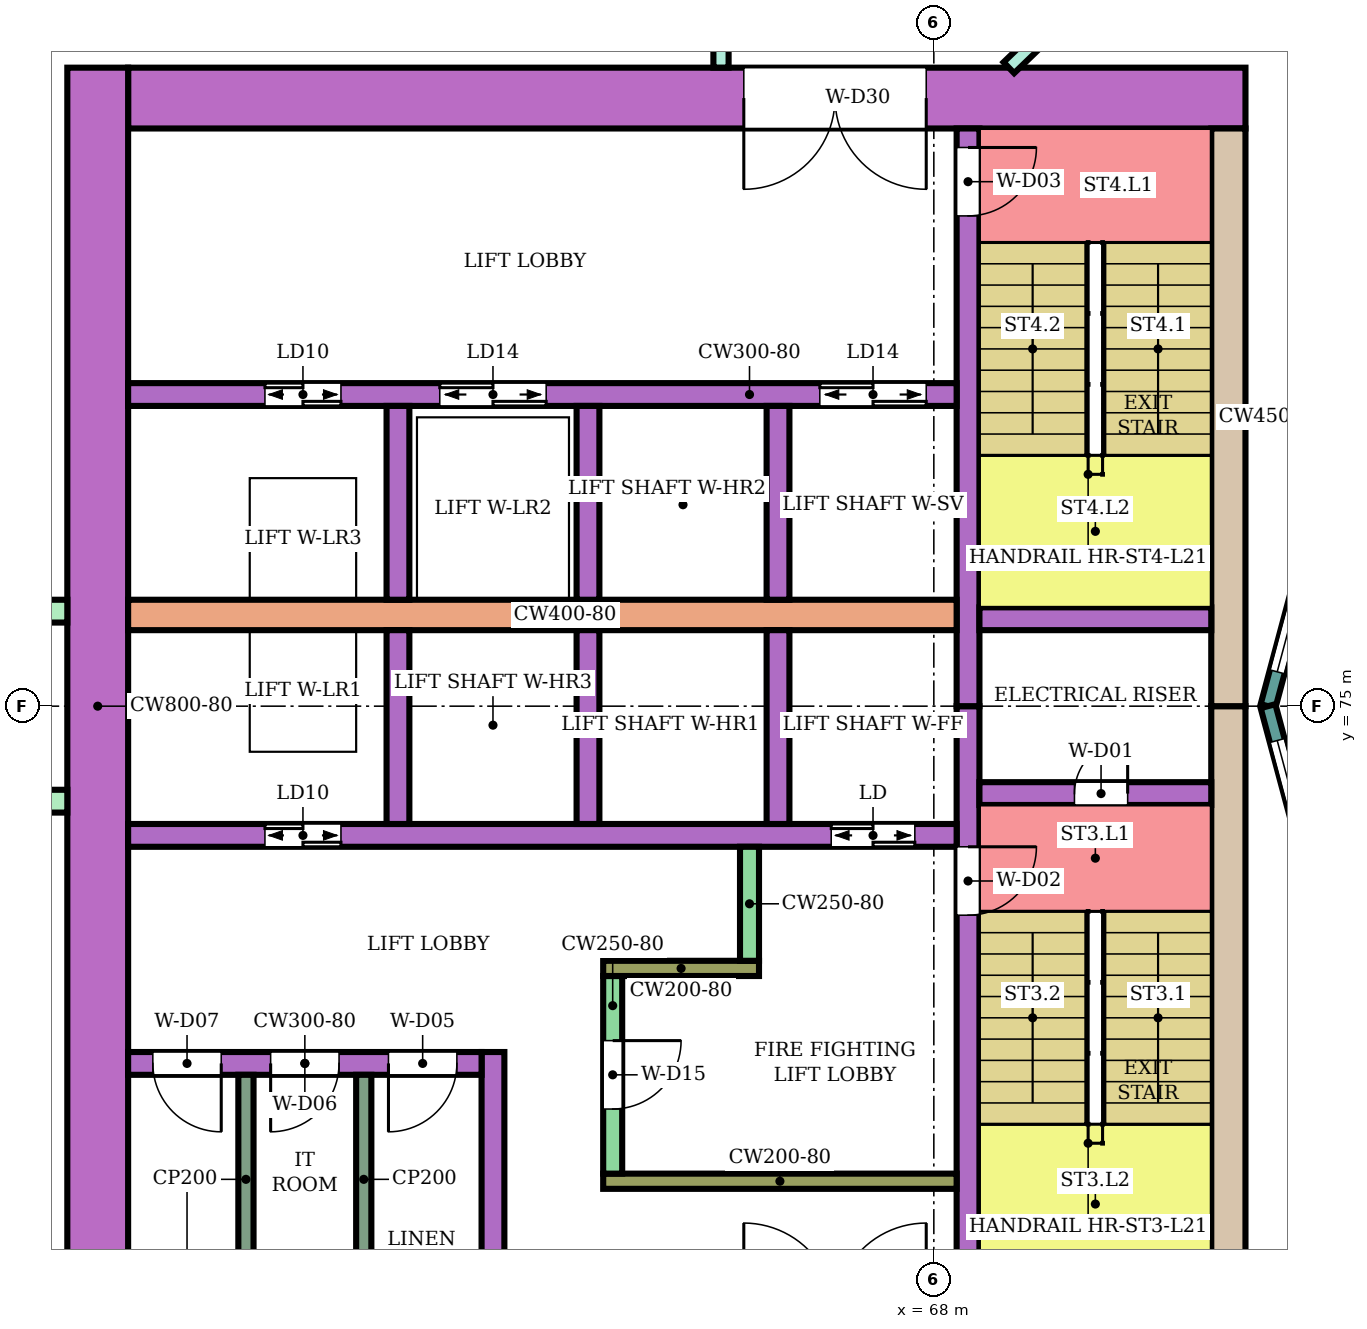
"""IFC4 building model, lengths in metres.
Left out: names, types, materials, properties, quantities, classifications, styles, units other than length and angle.
Written with IfcOpenShell. Run it as: python <this file> out.ifc"""

import sys

from ifc_helpers import new_model, si_unit, direction, frame, frame_2d, origin, place, context, subcontext, project, spatial, rectangle, extrude, element, fill, save


model = new_model("IFC4")
c1 = context("Model", 3, precision=1e-05, world=origin(), true_north=direction((0.0, 1.0)))
c2 = subcontext(c1, "Body", "Model", "MODEL_VIEW")
j1 = project(units=[si_unit("LENGTHUNIT", "METRE"), si_unit("PLANEANGLEUNIT", "RADIAN")], contexts=[c1])
p1 = place(None, origin())
s1 = spatial("IfcSite", under=j1, at=p1, CompositionType="ELEMENT")
p2 = place(p1, origin())
s2 = spatial("IfcBuilding", under=s1, at=p2, CompositionType="ELEMENT")
p3 = place(p2, frame((0.0, 0.0, 93.8)))
s3 = spatial("IfcBuildingStorey", under=s2, at=p3, CompositionType="ELEMENT", Elevation=93.8)
p4 = place(p3, frame((72.1, 83.0, 0.0), z_axis=(0.0, 0.0, 1.0), x_axis=(-1.0, 0.0, 0.0)))
e1 = element("IfcWall", 1, at=p4, inside=s3, PredefinedType="SHEAR", context=c2, shape_type="SweptSolid", body=[
    extrude(rectangle(XDim=14.7, YDim=0.8, at=frame_2d((7.35, 0.0))), origin(), (0.0, 0.0, 1.0), 3.48),
])
p5 = place(p4, frame((4.2, 0.0, 0.0)))
e2 = element("IfcOpeningElement", 2, at=p5, cuts=e1, PredefinedType="OPENING", context=c2, shape_type="SweptSolid", body=[
    extrude(rectangle(XDim=2.4, YDim=2.4, at=frame_2d((1.2, 1.2))), frame((0.0, 0.41, 0.0), z_axis=(0.0, -1.0, 0.0), x_axis=(1.0, 0.0, 0.0)), (0.0, 0.0, 1.0), 0.82),
])
for number, where, z_axis, x_axis in (
    (3, (71.875, 75.0, 0.0), (0.0, 0.0, 1.0), (0.0, -1.0, 0.0)),
    (4, (71.875, 82.6, 0.0), (0.0, 0.0, 1.0), (0.0, -1.0, 0.0)),
):
    element("IfcWall", number, at=place(p3, frame(where, z_axis=z_axis, x_axis=x_axis)), inside=s3, PredefinedType="SHEAR", context=c2, shape_type="SweptSolid", body=[
        extrude(rectangle(XDim=7.6, YDim=0.45, at=frame_2d((3.8, 0.0))), origin(), (0.0, 0.0, 1.0), 3.48),
    ])
p6 = place(p3, frame((57.0, 83.4, 0.0), z_axis=(0.0, 0.0, 1.0), x_axis=(0.0, -1.0, 0.0)))
e5 = element("IfcWall", 5, at=p6, inside=s3, PredefinedType="SHEAR", context=c2, shape_type="SweptSolid", body=[
    extrude(rectangle(XDim=16.8, YDim=0.8, at=frame_2d((8.4, 0.0))), origin(), (0.0, 0.0, 1.0), 3.48),
])
p7 = place(p3, frame((68.45, 75.0, 0.0), z_axis=(0.0, 0.0, 1.0), x_axis=(0.0, -1.0, 0.0)))
e6 = element("IfcWall", 6, at=p7, inside=s3, PredefinedType="SHEAR", context=c2, shape_type="SweptSolid", body=[
    extrude(rectangle(XDim=7.6, YDim=0.3, at=frame_2d((3.8, 0.0))), origin(), (0.0, 0.0, 1.0), 3.48),
])
p8 = place(p7, frame((1.85, 0.0, 0.0)))
e7 = element("IfcOpeningElement", 7, at=p8, cuts=e6, PredefinedType="OPENING", context=c2, shape_type="SweptSolid", body=[
    extrude(rectangle(XDim=0.9, YDim=2.1, at=frame_2d((0.45, 1.05))), frame((0.0, 0.16, 0.0), z_axis=(0.0, -1.0, 0.0), x_axis=(1.0, 0.0, 0.0)), (0.0, 0.0, 1.0), 0.32),
])
p9 = place(p3, frame((68.45, 82.6, 0.0), z_axis=(0.0, 0.0, 1.0), x_axis=(0.0, -1.0, 0.0)))
e8 = element("IfcWall", 8, at=p9, inside=s3, PredefinedType="SHEAR", context=c2, shape_type="SweptSolid", body=[
    extrude(rectangle(XDim=7.6, YDim=0.3, at=frame_2d((3.8, 0.0))), origin(), (0.0, 0.0, 1.0), 3.48),
])
p10 = place(p9, frame((0.25, 0.0, 0.0)))
e9 = element("IfcOpeningElement", 9, at=p10, cuts=e8, PredefinedType="OPENING", context=c2, shape_type="SweptSolid", body=[
    extrude(rectangle(XDim=0.9, YDim=2.1, at=frame_2d((0.45, 1.05))), frame((0.0, 0.16, 0.0), z_axis=(0.0, -1.0, 0.0), x_axis=(1.0, 0.0, 0.0)), (0.0, 0.0, 1.0), 0.32),
])
p11 = place(p3, frame((71.65, 73.85, 0.0), z_axis=(0.0, 0.0, 1.0), x_axis=(-1.0, 0.0, 0.0)))
e10 = element("IfcWall", 10, at=p11, inside=s3, PredefinedType="SHEAR", context=c2, shape_type="SweptSolid", body=[
    extrude(rectangle(XDim=3.05, YDim=0.3, at=frame_2d((1.525, 0.0))), origin(), (0.0, 0.0, 1.0), 3.48),
])
p12 = place(p11, frame((1.1, 0.0, 0.0)))
e11 = element("IfcOpeningElement", 11, at=p12, cuts=e10, PredefinedType="OPENING", context=c2, shape_type="SweptSolid", body=[
    extrude(rectangle(XDim=0.7, YDim=2.0, at=frame_2d((0.35, 1.0))), frame((0.0, 0.16, 0.0), z_axis=(0.0, -1.0, 0.0), x_axis=(1.0, 0.0, 0.0)), (0.0, 0.0, 1.0), 0.32),
])
p13 = place(p3, frame((71.65, 76.15, 0.0), z_axis=(0.0, 0.0, 1.0), x_axis=(-1.0, 0.0, 0.0)))
e12 = element("IfcWall", 12, at=p13, inside=s3, PredefinedType="SHEAR", context=c2, shape_type="SweptSolid", body=[
    extrude(rectangle(XDim=3.05, YDim=0.3, at=frame_2d((1.525, 0.0))), origin(), (0.0, 0.0, 1.0), 3.48),
])
p14 = place(p3, frame((68.3, 73.3, 0.0), z_axis=(0.0, 0.0, 1.0), x_axis=(-1.0, 0.0, 0.0)))
e13 = element("IfcWall", 13, at=p14, inside=s3, PredefinedType="SHEAR", context=c2, shape_type="SweptSolid", body=[
    extrude(rectangle(XDim=10.9, YDim=0.3, at=frame_2d((5.45, 0.0))), origin(), (0.0, 0.0, 1.0), 3.48),
])
p15 = place(p14, frame((0.55, 0.0, 0.0)))
e14 = element("IfcOpeningElement", 14, at=p15, cuts=e13, PredefinedType="OPENING", context=c2, shape_type="SweptSolid", body=[
    extrude(rectangle(XDim=1.1, YDim=2.1, at=frame_2d((0.55, 1.05))), frame((0.0, 0.16, 0.0), z_axis=(0.0, -1.0, 0.0), x_axis=(1.0, 0.0, 0.0)), (0.0, 0.0, 1.0), 0.32),
])
p16 = place(p14, frame((8.1, 0.0, 0.0)))
e15 = element("IfcOpeningElement", 15, at=p16, cuts=e13, PredefinedType="OPENING", context=c2, shape_type="SweptSolid", body=[
    extrude(rectangle(XDim=1.0, YDim=2.1, at=frame_2d((0.5, 1.05))), frame((0.0, 0.16, 0.0), z_axis=(0.0, -1.0, 0.0), x_axis=(1.0, 0.0, 0.0)), (0.0, 0.0, 1.0), 0.32),
])
p17 = place(p3, frame((68.3, 76.2, 0.0), z_axis=(0.0, 0.0, 1.0), x_axis=(-1.0, 0.0, 0.0)))
e16 = element("IfcWall", 16, at=p17, inside=s3, PredefinedType="SHEAR", context=c2, shape_type="SweptSolid", body=[
    extrude(rectangle(XDim=10.9, YDim=0.4, at=frame_2d((5.45, 0.0))), origin(), (0.0, 0.0, 1.0), 3.48),
])
p18 = place(p3, frame((68.3, 79.1, 0.0), z_axis=(0.0, 0.0, 1.0), x_axis=(-1.0, 0.0, 0.0)))
e17 = element("IfcWall", 17, at=p18, inside=s3, PredefinedType="SHEAR", context=c2, shape_type="SweptSolid", body=[
    extrude(rectangle(XDim=10.9, YDim=0.3, at=frame_2d((5.45, 0.0))), origin(), (0.0, 0.0, 1.0), 3.48),
])
p19 = place(p18, frame((0.4, 0.0, 0.0)))
e18 = element("IfcOpeningElement", 18, at=p19, cuts=e17, PredefinedType="OPENING", context=c2, shape_type="SweptSolid", body=[
    extrude(rectangle(XDim=1.4, YDim=2.1, at=frame_2d((0.7, 1.05))), frame((0.0, 0.16, 0.0), z_axis=(0.0, -1.0, 0.0), x_axis=(1.0, 0.0, 0.0)), (0.0, 0.0, 1.0), 0.32),
])
p20 = place(p18, frame((5.4, 0.0, 0.0)))
e19 = element("IfcOpeningElement", 19, at=p20, cuts=e17, PredefinedType="OPENING", context=c2, shape_type="SweptSolid", body=[
    extrude(rectangle(XDim=1.4, YDim=2.1, at=frame_2d((0.7, 1.05))), frame((0.0, 0.16, 0.0), z_axis=(0.0, -1.0, 0.0), x_axis=(1.0, 0.0, 0.0)), (0.0, 0.0, 1.0), 0.32),
])
p21 = place(p18, frame((8.1, 0.0, 0.0)))
e20 = element("IfcOpeningElement", 20, at=p21, cuts=e17, PredefinedType="OPENING", context=c2, shape_type="SweptSolid", body=[
    extrude(rectangle(XDim=1.0, YDim=2.1, at=frame_2d((0.5, 1.05))), frame((0.0, 0.16, 0.0), z_axis=(0.0, -1.0, 0.0), x_axis=(1.0, 0.0, 0.0)), (0.0, 0.0, 1.0), 0.32),
])
for number, where, z_axis, x_axis in (
    (21, (65.95, 76.0, 0.0), (0.0, 0.0, 1.0), (0.0, -1.0, 0.0)),
    (22, (63.45, 76.0, 0.0), (0.0, 0.0, 1.0), (0.0, -1.0, 0.0)),
    (23, (60.95, 76.0, 0.0), (0.0, 0.0, 1.0), (0.0, -1.0, 0.0)),
    (24, (65.95, 78.95, 0.0), (0.0, 0.0, 1.0), (0.0, -1.0, 0.0)),
    (25, (63.45, 78.95, 0.0), (0.0, 0.0, 1.0), (0.0, -1.0, 0.0)),
    (26, (60.95, 78.95, 0.0), (0.0, 0.0, 1.0), (0.0, -1.0, 0.0)),
):
    element("IfcWall", number, at=place(p3, frame(where, z_axis=z_axis, x_axis=x_axis)), inside=s3, PredefinedType="SHEAR", context=c2, shape_type="SweptSolid", body=[
        extrude(rectangle(XDim=2.55, YDim=0.3, at=frame_2d((1.275, 0.0))), origin(), (0.0, 0.0, 1.0), 3.48),
    ])
p22 = place(p3, frame((68.3, 68.75, 0.0), z_axis=(0.0, 0.0, 1.0), x_axis=(-1.0, 0.0, 0.0)))
e27 = element("IfcWall", 27, at=p22, inside=s3, PredefinedType="SHEAR", context=c2, shape_type="SweptSolid", body=[
    extrude(rectangle(XDim=4.65, YDim=0.2, at=frame_2d((2.325, 0.0))), origin(), (0.0, 0.0, 1.0), 3.48),
])
p23 = place(p3, frame((63.775, 71.45, 0.0), z_axis=(0.0, 0.0, 1.0), x_axis=(0.0, -1.0, 0.0)))
e28 = element("IfcWall", 28, at=p23, inside=s3, PredefinedType="SHEAR", context=c2, shape_type="SweptSolid", body=[
    extrude(rectangle(XDim=2.6, YDim=0.25, at=frame_2d((1.3, 0.0))), origin(), (0.0, 0.0, 1.0), 3.48),
])
p24 = place(p23, frame((0.85, 0.0, 0.0)))
e29 = element("IfcOpeningElement", 29, at=p24, cuts=e28, PredefinedType="OPENING", context=c2, shape_type="SweptSolid", body=[
    extrude(rectangle(XDim=0.9, YDim=2.1, at=frame_2d((0.45, 1.05))), frame((0.0, 0.135, 0.0), z_axis=(0.0, -1.0, 0.0), x_axis=(1.0, 0.0, 0.0)), (0.0, 0.0, 1.0), 0.27),
])
p25 = place(p3, frame((65.7, 71.55, 0.0), z_axis=(0.0, 0.0, 1.0), x_axis=(-1.0, 0.0, 0.0)))
e30 = element("IfcWall", 30, at=p25, inside=s3, PredefinedType="SHEAR", context=c2, shape_type="SweptSolid", body=[
    extrude(rectangle(XDim=2.05, YDim=0.2, at=frame_2d((1.025, 0.0))), origin(), (0.0, 0.0, 1.0), 3.48),
])
p26 = place(p3, frame((65.575, 73.15, 0.0), z_axis=(0.0, 0.0, 1.0), x_axis=(0.0, -1.0, 0.0)))
e31 = element("IfcWall", 31, at=p26, inside=s3, PredefinedType="SHEAR", context=c2, shape_type="SweptSolid", body=[
    extrude(rectangle(XDim=1.5, YDim=0.25, at=frame_2d((0.75, 0.0))), origin(), (0.0, 0.0, 1.0), 3.48),
])
p27 = place(p3, frame((62.2, 70.45, 0.0), z_axis=(0.0, 0.0, 1.0), x_axis=(0.0, -1.0, 0.0)))
e32 = element("IfcWall", 32, at=p27, inside=s3, PredefinedType="SHEAR", context=c2, shape_type="SweptSolid", body=[
    extrude(rectangle(XDim=3.05, YDim=0.3, at=frame_2d((1.525, 0.0))), origin(), (0.0, 0.0, 1.0), 3.48),
])
p28 = place(p3, frame((62.05, 70.3, 0.0), z_axis=(0.0, 0.0, 1.0), x_axis=(-1.0, 0.0, 0.0)))
e33 = element("IfcWall", 33, at=p28, inside=s3, PredefinedType="SHEAR", context=c2, shape_type="SweptSolid", body=[
    extrude(rectangle(XDim=4.65, YDim=0.3, at=frame_2d((2.325, 0.0))), origin(), (0.0, 0.0, 1.0), 3.48),
])
p29 = place(p28, frame((0.325, 0.0, 0.0)))
e34 = element("IfcOpeningElement", 34, at=p29, cuts=e33, PredefinedType="OPENING", context=c2, shape_type="SweptSolid", body=[
    extrude(rectangle(XDim=0.9, YDim=2.1, at=frame_2d((0.45, 1.05))), frame((0.0, 0.16, 0.0), z_axis=(0.0, -1.0, 0.0), x_axis=(1.0, 0.0, 0.0)), (0.0, 0.0, 1.0), 0.32),
])
p30 = place(p28, frame((1.875, 0.0, 0.0)))
e35 = element("IfcOpeningElement", 35, at=p30, cuts=e33, PredefinedType="OPENING", context=c2, shape_type="SweptSolid", body=[
    extrude(rectangle(XDim=0.9, YDim=2.1, at=frame_2d((0.45, 1.05))), frame((0.0, 0.16, 0.0), z_axis=(0.0, -1.0, 0.0), x_axis=(1.0, 0.0, 0.0)), (0.0, 0.0, 1.0), 0.32),
])
p31 = place(p28, frame((3.425, 0.0, 0.0)))
e36 = element("IfcOpeningElement", 36, at=p31, cuts=e33, PredefinedType="OPENING", context=c2, shape_type="SweptSolid", body=[
    extrude(rectangle(XDim=0.9, YDim=2.1, at=frame_2d((0.45, 1.05))), frame((0.0, 0.16, 0.0), z_axis=(0.0, -1.0, 0.0), x_axis=(1.0, 0.0, 0.0)), (0.0, 0.0, 1.0), 0.32),
])
for number, where, z_axis, x_axis in (
    (37, (56.6, 76.25, 0.0), (0.0, 0.0, 1.0), (-1.0, 0.0, 0.0)),
    (38, (56.6, 73.75, 0.0), (0.0, 0.0, 1.0), (-1.0, 0.0, 0.0)),
):
    element("IfcWall", number, at=place(p3, frame(where, z_axis=z_axis, x_axis=x_axis)), inside=s3, PredefinedType="NOTDEFINED", context=c2, shape_type="SweptSolid", body=[
        extrude(rectangle(XDim=2.416, YDim=0.3, at=frame_2d((1.208, 0.0))), origin(), (0.0, 0.0, 1.0), 3.8),
    ])
p32 = place(p3, frame((73.415, 78.802, 0.0), z_axis=(0.0, 0.0, 1.0), x_axis=(-0.258789828301, -0.965933654434, 0.0)))
e39 = element("IfcWall", 39, at=p32, inside=s3, PredefinedType="NOTDEFINED", context=c2, shape_type="SweptSolid", body=[
    extrude(rectangle(XDim=3.936, YDim=0.2, at=frame_2d((1.968, 0.0))), origin(), (0.0, 0.0, 1.0), 3.8),
])
p33 = place(p32, frame((0.468, 0.0, 0.9)))
e40 = element("IfcOpeningElement", 40, at=p33, cuts=e39, PredefinedType="OPENING", context=c2, shape_type="SweptSolid", body=[
    extrude(rectangle(XDim=3.0, YDim=2.3, at=frame_2d((1.5, 1.15))), frame((0.0, 0.11, 0.0), z_axis=(0.0, -1.0, 0.0), x_axis=(1.0, 0.0, 0.0)), (0.0, 0.0, 1.0), 0.22),
])
p34 = place(p3, frame((72.396, 75.0, 0.0), z_axis=(0.0, 0.0, 1.0), x_axis=(0.258789828301, -0.965933654434, 0.0)))
e41 = element("IfcWall", 41, at=p34, inside=s3, PredefinedType="NOTDEFINED", context=c2, shape_type="SweptSolid", body=[
    extrude(rectangle(XDim=3.936, YDim=0.2, at=frame_2d((1.968, 0.0))), origin(), (0.0, 0.0, 1.0), 3.8),
])
p35 = place(p34, frame((0.468, 0.0, 0.9)))
e42 = element("IfcOpeningElement", 42, at=p35, cuts=e41, PredefinedType="OPENING", context=c2, shape_type="SweptSolid", body=[
    extrude(rectangle(XDim=3.0, YDim=2.3, at=frame_2d((1.5, 1.15))), frame((0.0, 0.11, 0.0), z_axis=(0.0, -1.0, 0.0), x_axis=(1.0, 0.0, 0.0)), (0.0, 0.0, 1.0), 0.22),
])
p36 = place(p3, frame((65.2, 83.401, 0.0), z_axis=(0.0, 0.0, 1.0), x_axis=(0.0, 1.0, 0.0)))
e43 = element("IfcWall", 43, at=p36, inside=s3, PredefinedType="PARTITIONING", context=c2, shape_type="SweptSolid", body=[
    extrude(rectangle(XDim=1.399, YDim=0.2, at=frame_2d((0.7, 0.0))), origin(), (0.0, 0.0, 1.0), 3.35),
])
p37 = place(p3, frame((68.987, 83.4, 0.0), z_axis=(0.0, 0.0, 1.0), x_axis=(0.719586298962, 0.694403022997, 0.0)))
e44 = element("IfcWall", 44, at=p37, inside=s3, PredefinedType="PARTITIONING", context=c2, shape_type="SweptSolid", body=[
    extrude(rectangle(XDim=5.439, YDim=0.2, at=frame_2d((2.719, 0.0))), origin(), (0.0, 0.0, 1.0), 3.35),
])
for number, where, z_axis, x_axis in (
    (45, (60.5, 70.15, 0.0), (0.0, 0.0, 1.0), (0.0, -1.0, 0.0)),
    (46, (58.95, 70.15, 0.0), (0.0, 0.0, 1.0), (0.0, -1.0, 0.0)),
):
    element("IfcWall", number, at=place(p3, frame(where, z_axis=z_axis, x_axis=x_axis)), inside=s3, PredefinedType="PARTITIONING", context=c2, shape_type="SweptSolid", body=[
        extrude(rectangle(XDim=2.75, YDim=0.2, at=frame_2d((1.375, 0.0))), origin(), (0.0, 0.0, 1.0), 3.48),
    ])
p38 = place(p33, origin())
e47 = element("IfcWindow", 47, at=p38, inside=s3, PartitioningType="SINGLE_PANEL", PredefinedType="WINDOW", context=c2, shape_type="SweptSolid", body=[
    extrude(rectangle(XDim=3.0, YDim=2.3, at=frame_2d((1.5, 1.15))), frame((0.0, 0.03, 0.0), z_axis=(0.0, -1.0, 0.0), x_axis=(1.0, 0.0, 0.0)), (0.0, 0.0, 1.0), 0.06),
])
fill(e40, e47)
p39 = place(p35, origin())
e48 = element("IfcWindow", 48, at=p39, inside=s3, PartitioningType="SINGLE_PANEL", PredefinedType="WINDOW", context=c2, shape_type="SweptSolid", body=[
    extrude(rectangle(XDim=3.0, YDim=2.3, at=frame_2d((1.5, 1.15))), frame((0.0, 0.03, 0.0), z_axis=(0.0, -1.0, 0.0), x_axis=(1.0, 0.0, 0.0)), (0.0, 0.0, 1.0), 0.06),
])
fill(e42, e48)
p40 = place(p12, frame((0.7, 0.0, 0.0), z_axis=(0.0, 0.0, 1.0), x_axis=(-1.0, 0.0, 0.0)))
e49 = element("IfcDoor", 49, at=p40, inside=s3, OperationType="SINGLE_SWING_RIGHT", PredefinedType="DOOR", context=c2, shape_type="SweptSolid", body=[
    extrude(rectangle(XDim=0.7, YDim=2.0, at=frame_2d((0.35, 1.0))), frame((0.0, 0.025, 0.0), z_axis=(0.0, -1.0, 0.0), x_axis=(1.0, 0.0, 0.0)), (0.0, 0.0, 1.0), 0.05),
])
fill(e11, e49)
p41 = place(p8, origin())
e50 = element("IfcDoor", 50, at=p41, inside=s3, OperationType="SINGLE_SWING_LEFT", PredefinedType="DOOR", context=c2, shape_type="SweptSolid", body=[
    extrude(rectangle(XDim=0.9, YDim=2.1, at=frame_2d((0.45, 1.05))), frame((0.0, 0.025, 0.0), z_axis=(0.0, -1.0, 0.0), x_axis=(1.0, 0.0, 0.0)), (0.0, 0.0, 1.0), 0.05),
])
fill(e7, e50)
p42 = place(p10, origin())
e51 = element("IfcDoor", 51, at=p42, inside=s3, OperationType="SINGLE_SWING_LEFT", PredefinedType="DOOR", context=c2, shape_type="SweptSolid", body=[
    extrude(rectangle(XDim=0.9, YDim=2.1, at=frame_2d((0.45, 1.05))), frame((0.0, 0.025, 0.0), z_axis=(0.0, -1.0, 0.0), x_axis=(1.0, 0.0, 0.0)), (0.0, 0.0, 1.0), 0.05),
])
fill(e9, e51)
p43 = place(p15, origin())
e52 = element("IfcDoor", 52, at=p43, inside=s3, OperationType="DOUBLE_DOOR_SLIDING", PredefinedType="DOOR", context=c2, shape_type="SweptSolid", body=[
    extrude(rectangle(XDim=1.1, YDim=2.1, at=frame_2d((0.55, 1.05))), frame((0.0, 0.025, 0.0), z_axis=(0.0, -1.0, 0.0), x_axis=(1.0, 0.0, 0.0)), (0.0, 0.0, 1.0), 0.05),
])
fill(e14, e52)
p44 = place(p16, origin())
e53 = element("IfcDoor", 53, at=p44, inside=s3, OperationType="DOUBLE_DOOR_SLIDING", PredefinedType="DOOR", context=c2, shape_type="SweptSolid", body=[
    extrude(rectangle(XDim=1.0, YDim=2.1, at=frame_2d((0.5, 1.05))), frame((0.0, 0.025, 0.0), z_axis=(0.0, -1.0, 0.0), x_axis=(1.0, 0.0, 0.0)), (0.0, 0.0, 1.0), 0.05),
])
fill(e15, e53)
p45 = place(p19, origin())
e54 = element("IfcDoor", 54, at=p45, inside=s3, OperationType="DOUBLE_DOOR_SLIDING", PredefinedType="DOOR", context=c2, shape_type="SweptSolid", body=[
    extrude(rectangle(XDim=1.4, YDim=2.1, at=frame_2d((0.7, 1.05))), frame((0.0, 0.025, 0.0), z_axis=(0.0, -1.0, 0.0), x_axis=(1.0, 0.0, 0.0)), (0.0, 0.0, 1.0), 0.05),
])
fill(e18, e54)
p46 = place(p20, origin())
e55 = element("IfcDoor", 55, at=p46, inside=s3, OperationType="DOUBLE_DOOR_SLIDING", PredefinedType="DOOR", context=c2, shape_type="SweptSolid", body=[
    extrude(rectangle(XDim=1.4, YDim=2.1, at=frame_2d((0.7, 1.05))), frame((0.0, 0.025, 0.0), z_axis=(0.0, -1.0, 0.0), x_axis=(1.0, 0.0, 0.0)), (0.0, 0.0, 1.0), 0.05),
])
fill(e19, e55)
p47 = place(p21, origin())
e56 = element("IfcDoor", 56, at=p47, inside=s3, OperationType="DOUBLE_DOOR_SLIDING", PredefinedType="DOOR", context=c2, shape_type="SweptSolid", body=[
    extrude(rectangle(XDim=1.0, YDim=2.1, at=frame_2d((0.5, 1.05))), frame((0.0, 0.025, 0.0), z_axis=(0.0, -1.0, 0.0), x_axis=(1.0, 0.0, 0.0)), (0.0, 0.0, 1.0), 0.05),
])
fill(e20, e56)
p48 = place(p24, origin())
e57 = element("IfcDoor", 57, at=p48, inside=s3, OperationType="SINGLE_SWING_LEFT", PredefinedType="DOOR", context=c2, shape_type="SweptSolid", body=[
    extrude(rectangle(XDim=0.9, YDim=2.1, at=frame_2d((0.45, 1.05))), frame((0.0, 0.025, 0.0), z_axis=(0.0, -1.0, 0.0), x_axis=(1.0, 0.0, 0.0)), (0.0, 0.0, 1.0), 0.05),
])
fill(e29, e57)
p49 = place(p29, origin())
e58 = element("IfcDoor", 58, at=p49, inside=s3, OperationType="SINGLE_SWING_RIGHT", PredefinedType="DOOR", context=c2, shape_type="SweptSolid", body=[
    extrude(rectangle(XDim=0.9, YDim=2.1, at=frame_2d((0.45, 1.05))), frame((0.0, 0.025, 0.0), z_axis=(0.0, -1.0, 0.0), x_axis=(1.0, 0.0, 0.0)), (0.0, 0.0, 1.0), 0.05),
])
fill(e34, e58)
p50 = place(p30, origin())
e59 = element("IfcDoor", 59, at=p50, inside=s3, OperationType="SINGLE_SWING_RIGHT", PredefinedType="DOOR", context=c2, shape_type="SweptSolid", body=[
    extrude(rectangle(XDim=0.9, YDim=2.1, at=frame_2d((0.45, 1.05))), frame((0.0, 0.025, 0.0), z_axis=(0.0, -1.0, 0.0), x_axis=(1.0, 0.0, 0.0)), (0.0, 0.0, 1.0), 0.05),
])
fill(e35, e59)
p51 = place(p31, origin())
e60 = element("IfcDoor", 60, at=p51, inside=s3, OperationType="SINGLE_SWING_LEFT", PredefinedType="DOOR", context=c2, shape_type="SweptSolid", body=[
    extrude(rectangle(XDim=0.9, YDim=2.1, at=frame_2d((0.45, 1.05))), frame((0.0, 0.025, 0.0), z_axis=(0.0, -1.0, 0.0), x_axis=(1.0, 0.0, 0.0)), (0.0, 0.0, 1.0), 0.05),
])
fill(e36, e60)
p52 = place(p5, origin())
e61 = element("IfcDoor", 61, at=p52, inside=s3, OperationType="DOUBLE_DOOR_SINGLE_SWING", PredefinedType="DOOR", context=c2, shape_type="SweptSolid", body=[
    extrude(rectangle(XDim=2.4, YDim=2.4, at=frame_2d((1.2, 1.2))), frame((0.0, 0.025, 0.0), z_axis=(0.0, -1.0, 0.0), x_axis=(1.0, 0.0, 0.0)), (0.0, 0.0, 1.0), 0.05),
])
fill(e2, e61)
save(model, sys.argv[1])
